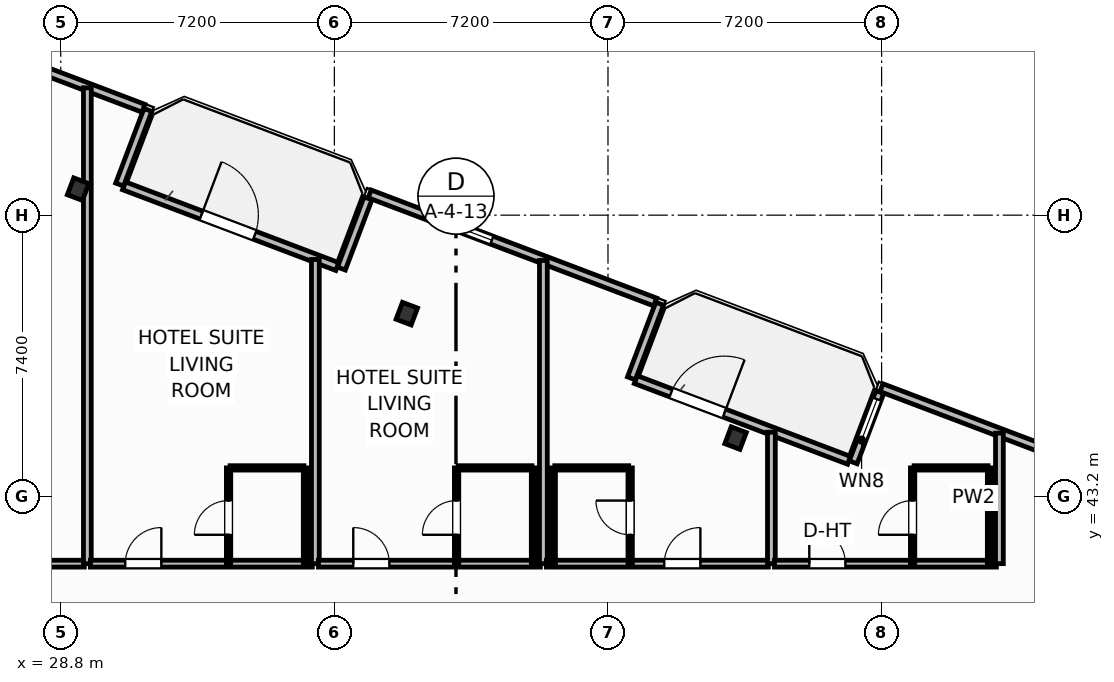
"""IFC4 building model, lengths in metres.
Left out: names, types, materials, properties, quantities, classifications, styles, units other than length and angle.
Written with IfcOpenShell. Run it as: python <this file> out.ifc"""

import sys

from ifc_helpers import new_model, si_unit, direction, frame, frame_2d, origin, origin_2d, place, context, subcontext, project, spatial, rectangle, i_section, extrude, element, fill, save


model = new_model("IFC4")
c1 = context("Model", 3, precision=1e-05, world=origin(), true_north=direction((0.0, 1.0)))
c2 = subcontext(c1, "Body", "Model", "MODEL_VIEW")
j1 = project(units=[si_unit("LENGTHUNIT", "METRE"), si_unit("PLANEANGLEUNIT", "RADIAN")], contexts=[c1])
p1 = place(None, origin())
s1 = spatial("IfcSite", under=j1, at=p1, CompositionType="ELEMENT")
p2 = place(p1, origin())
s2 = spatial("IfcBuilding", under=s1, at=p2, CompositionType="ELEMENT")
p3 = place(p2, frame((0.0, 0.0, 94.7)))
s3 = spatial("IfcBuildingStorey", under=s2, at=p3, CompositionType="ELEMENT", Elevation=94.7)
for number, where, z_axis, x_axis in (
    (1, (46.557, 44.734, 0.0), (0.0, 0.0, 1.0), (0.935, -0.354, 0.0)),
    (2, (37.906, 48.009, 0.0), (0.0, 0.0, 1.0), (0.935, -0.354, 0.0)),
    (3, (29.256, 51.284, 0.0), (0.0, 0.0, 1.0), (0.935, -0.354, 0.0)),
):
    element("IfcColumn", number, at=place(p3, frame(where, z_axis=z_axis, x_axis=x_axis)), inside=s3, PredefinedType="COLUMN", context=c2, shape_type="SweptSolid", body=[
        extrude(i_section(OverallWidth=0.424, OverallDepth=0.474, WebThickness=0.048, FlangeThickness=0.077, FilletRadius=0.025, at=origin_2d()), origin(), (0.0, 0.0, 1.0), 3.7),
    ])
p4 = place(p3, frame((30.465, 51.372, 0.0), z_axis=(0.0, 0.0, 1.0), x_axis=(0.935227640088, -0.354046976001, 0.0)))
e4 = element("IfcWall", 4, at=p4, inside=s3, PredefinedType="SOLIDWALL", context=c2, shape_type="SweptSolid", body=[
    extrude(rectangle(XDim=6.0, YDim=0.22, at=frame_2d((3.0, 0.0))), origin(), (0.0, 0.0, 1.0), 2.73),
])
p5 = place(p4, frame((2.176, 0.0, 0.0)))
e5 = element("IfcOpeningElement", 5, at=p5, cuts=e4, PredefinedType="OPENING", context=c2, shape_type="SweptSolid", body=[
    extrude(rectangle(XDim=1.5, YDim=2.25, at=frame_2d((0.75, 1.125))), frame((0.0, 0.12, 0.0), z_axis=(0.0, -1.0, 0.0), x_axis=(1.0, 0.0, 0.0)), (0.0, 0.0, 1.0), 0.24),
])
p6 = place(p3, frame((43.932, 46.273, 0.0), z_axis=(0.0, 0.0, 1.0), x_axis=(0.93521416643, -0.354082565101, 0.0)))
e6 = element("IfcWall", 6, at=p6, inside=s3, PredefinedType="SOLIDWALL", context=c2, shape_type="SweptSolid", body=[
    extrude(rectangle(XDim=6.0, YDim=0.22, at=frame_2d((3.0, 0.0))), origin(), (0.0, 0.0, 1.0), 2.73),
])
p7 = place(p6, frame((0.992, 0.0, 0.0)))
e7 = element("IfcOpeningElement", 7, at=p7, cuts=e6, PredefinedType="OPENING", context=c2, shape_type="SweptSolid", body=[
    extrude(rectangle(XDim=1.5, YDim=2.25, at=frame_2d((0.75, 1.125))), frame((0.0, 0.12, 0.0), z_axis=(0.0, -1.0, 0.0), x_axis=(1.0, 0.0, 0.0)), (0.0, 0.0, 1.0), 0.24),
])
p8 = place(p3, frame((57.91, 43.216, 0.0), z_axis=(0.0, 0.0, 1.0), x_axis=(-0.935220736163, 0.354065212427, 0.0)))
e8 = element("IfcWall", 8, at=p8, inside=s3, PredefinedType="SOLIDWALL", context=c2, shape_type="SweptSolid", body=[
    extrude(rectangle(XDim=8.035, YDim=0.22, at=frame_2d((4.018, 0.0))), origin(), (0.0, 0.0, 1.0), 2.73),
])
p9 = place(p8, frame((1.788, 0.0, 0.8)))
e9 = element("IfcOpeningElement", 9, at=p9, cuts=e8, PredefinedType="OPENING", context=c2, shape_type="SweptSolid", body=[
    extrude(rectangle(XDim=1.65, YDim=1.65, at=frame_2d((0.825, 0.825))), frame((0.0, 0.12, 0.0), z_axis=(0.0, -1.0, 0.0), x_axis=(1.0, 0.0, 0.0)), (0.0, 0.0, 1.0), 0.24),
])
p10 = place(p3, frame((50.352, 45.944, 0.0), z_axis=(0.0, 0.0, 1.0), x_axis=(-0.354061611705, -0.935222099352, 0.0)))
e10 = element("IfcWall", 10, at=p10, inside=s3, PredefinedType="SOLIDWALL", context=c2, shape_type="SweptSolid", body=[
    extrude(rectangle(XDim=1.975, YDim=0.22, at=frame_2d((0.987, 0.0))), origin(), (0.0, 0.0, 1.0), 2.73),
])
p11 = place(p10, frame((0.2, 0.0, 0.8)))
e11 = element("IfcOpeningElement", 11, at=p11, cuts=e10, PredefinedType="OPENING", context=c2, shape_type="SweptSolid", body=[
    extrude(rectangle(XDim=1.15, YDim=1.4, at=frame_2d((0.575, 0.7))), frame((0.0, 0.12, 0.0), z_axis=(0.0, -1.0, 0.0), x_axis=(1.0, 0.0, 0.0)), (0.0, 0.0, 1.0), 0.24),
])
p12 = place(p3, frame((43.817, 46.306, 0.0), z_axis=(0.0, 0.0, 1.0), x_axis=(0.353988291547, 0.935249854022, 0.0)))
e12 = element("IfcWall", 12, at=p12, inside=s3, PredefinedType="SOLIDWALL", context=c2, shape_type="SweptSolid", body=[
    extrude(rectangle(XDim=2.1, YDim=0.22, at=frame_2d((1.05, 0.0))), origin(), (0.0, 0.0, 1.0), 2.73),
])
p13 = place(p3, frame((44.443, 48.314, 0.0), z_axis=(0.0, 0.0, 1.0), x_axis=(-0.935226988293, 0.354048697735, 0.0)))
e13 = element("IfcWall", 13, at=p13, inside=s3, PredefinedType="SOLIDWALL", context=c2, shape_type="SweptSolid", body=[
    extrude(rectangle(XDim=8.035, YDim=0.22, at=frame_2d((4.018, 0.0))), origin(), (0.0, 0.0, 1.0), 2.73),
])
p14 = place(p13, frame((4.597, 0.0, 0.8)))
e14 = element("IfcOpeningElement", 14, at=p14, cuts=e13, PredefinedType="OPENING", context=c2, shape_type="SweptSolid", body=[
    extrude(rectangle(XDim=1.65, YDim=1.65, at=frame_2d((0.825, 0.825))), frame((0.0, 0.12, 0.0), z_axis=(0.0, -1.0, 0.0), x_axis=(1.0, 0.0, 0.0)), (0.0, 0.0, 1.0), 0.24),
])
p15 = place(p3, frame((36.885, 51.042, 0.0), z_axis=(0.0, 0.0, 1.0), x_axis=(-0.354128791944, -0.935196663123, 0.0)))
e15 = element("IfcWall", 15, at=p15, inside=s3, PredefinedType="SOLIDWALL", context=c2, shape_type="SweptSolid", body=[
    extrude(rectangle(XDim=1.975, YDim=0.22, at=frame_2d((0.988, 0.0))), origin(), (0.0, 0.0, 1.0), 2.73),
])
p16 = place(p3, frame((30.349, 51.405, 0.0), z_axis=(0.0, 0.0, 1.0), x_axis=(0.354128469405, 0.935196785258, 0.0)))
e16 = element("IfcWall", 16, at=p16, inside=s3, PredefinedType="SOLIDWALL", context=c2, shape_type="SweptSolid", body=[
    extrude(rectangle(XDim=2.1, YDim=0.22, at=frame_2d((1.05, 0.0))), origin(), (0.0, 0.0, 1.0), 2.73),
])
p17 = place(p3, frame((30.976, 53.413, 0.0), z_axis=(0.0, 0.0, 1.0), x_axis=(-0.935220327379, 0.354066292178, 0.0)))
e17 = element("IfcWall", 17, at=p17, inside=s3, PredefinedType="SOLIDWALL", context=c2, shape_type="SweptSolid", body=[
    extrude(rectangle(XDim=14.347, YDim=0.22, at=frame_2d((7.174, 0.0))), origin(), (0.0, 0.0, 1.0), 2.73),
])
p18 = place(p17, frame((3.555, 0.0, 0.8)))
e18 = element("IfcOpeningElement", 18, at=p18, cuts=e17, PredefinedType="OPENING", context=c2, shape_type="SweptSolid", body=[
    extrude(rectangle(XDim=1.65, YDim=1.65, at=frame_2d((0.825, 0.825))), frame((0.0, 0.12, 0.0), z_axis=(0.0, -1.0, 0.0), x_axis=(1.0, 0.0, 0.0)), (0.0, 0.0, 1.0), 0.24),
])
p19 = place(p3, frame((23.58, 41.43, 0.0), z_axis=(0.0, 0.0, 1.0), x_axis=(1.0, 0.0, 0.0)))
e19 = element("IfcWall", 19, at=p19, inside=s3, PredefinedType="PARTITIONING", context=c2, shape_type="SweptSolid", body=[
    extrude(rectangle(XDim=5.84, YDim=0.18, at=frame_2d((2.92, 0.0))), origin(), (0.0, 0.0, 1.0), 3.45),
])
p20 = place(p19, frame((3.101, 0.0, 0.0)))
e20 = element("IfcOpeningElement", 20, at=p20, cuts=e19, PredefinedType="OPENING", context=c2, shape_type="SweptSolid", body=[
    extrude(rectangle(XDim=0.95, YDim=2.15, at=frame_2d((0.475, 1.075))), frame((0.0, 0.1, 0.0), z_axis=(0.0, -1.0, 0.0), x_axis=(1.0, 0.0, 0.0)), (0.0, 0.0, 1.0), 0.2),
])
p21 = place(p3, frame((29.5, 41.43, 0.0), z_axis=(0.0, 0.0, 1.0), x_axis=(0.0, 1.0, 0.0)))
e21 = element("IfcWall", 21, at=p21, inside=s3, PredefinedType="PARTITIONING", context=c2, shape_type="SweptSolid", body=[
    extrude(rectangle(XDim=12.52, YDim=0.205, at=frame_2d((6.26, 0.0))), origin(), (0.0, 0.0, 1.0), 2.58),
])
p22 = place(p3, frame((29.58, 41.43, 0.0), z_axis=(0.0, 0.0, 1.0), x_axis=(1.0, 0.0, 0.0)))
e22 = element("IfcWall", 22, at=p22, inside=s3, PredefinedType="PARTITIONING", context=c2, shape_type="SweptSolid", body=[
    extrude(rectangle(XDim=5.84, YDim=0.18, at=frame_2d((2.92, 0.0))), origin(), (0.0, 0.0, 1.0), 3.45),
])
p23 = place(p22, frame((0.917, 0.0, 0.0)))
e23 = element("IfcOpeningElement", 23, at=p23, cuts=e22, PredefinedType="OPENING", context=c2, shape_type="SweptSolid", body=[
    extrude(rectangle(XDim=0.95, YDim=2.15, at=frame_2d((0.475, 1.075))), frame((0.0, 0.1, 0.0), z_axis=(0.0, -1.0, 0.0), x_axis=(1.0, 0.0, 0.0)), (0.0, 0.0, 1.0), 0.2),
])
p24 = place(p3, frame((33.256, 43.95, 0.0), z_axis=(0.0, 0.0, 1.0), x_axis=(1.0, 0.0, 0.0)))
e24 = element("IfcWall", 24, at=p24, inside=s3, PredefinedType="PARTITIONING", context=c2, shape_type="SweptSolid", body=[
    extrude(rectangle(XDim=1.944, YDim=0.115, at=frame_2d((0.972, 0.0))), origin(), (0.0, 0.0, 1.0), 3.45),
])
p25 = place(p3, frame((33.216, 41.43, 0.0), z_axis=(0.0, 0.0, 1.0), x_axis=(0.0, 1.0, 0.0)))
e25 = element("IfcWall", 25, at=p25, inside=s3, PredefinedType="PARTITIONING", context=c2, shape_type="SweptSolid", body=[
    extrude(rectangle(XDim=2.52, YDim=0.115, at=frame_2d((1.26, 0.0))), origin(), (0.0, 0.0, 1.0), 3.45),
])
p26 = place(p25, frame((0.76, 0.0, 0.0)))
e26 = element("IfcOpeningElement", 26, at=p26, cuts=e25, PredefinedType="OPENING", context=c2, shape_type="SweptSolid", body=[
    extrude(rectangle(XDim=0.9, YDim=2.05, at=frame_2d((0.45, 1.025))), frame((0.0, 0.067, 0.0), z_axis=(0.0, -1.0, 0.0), x_axis=(1.0, 0.0, 0.0)), (0.0, 0.0, 1.0), 0.135),
])
p27 = place(p3, frame((35.24, 41.43, 0.0), z_axis=(0.0, 0.0, 1.0), x_axis=(0.0, 1.0, 0.0)))
e27 = element("IfcWall", 27, at=p27, inside=s3, PredefinedType="PARTITIONING", context=c2, shape_type="SweptSolid", body=[
    extrude(rectangle(XDim=2.52, YDim=0.115, at=frame_2d((1.26, 0.0))), origin(), (0.0, 0.0, 1.0), 3.45),
])
p28 = place(p3, frame((35.5, 41.43, 0.0), z_axis=(0.0, 0.0, 1.0), x_axis=(0.0, 1.0, 0.0)))
e28 = element("IfcWall", 28, at=p28, inside=s3, PredefinedType="PARTITIONING", context=c2, shape_type="SweptSolid", body=[
    extrude(rectangle(XDim=8.003, YDim=0.205, at=frame_2d((4.002, 0.0))), origin(), (0.0, 0.0, 1.0), 3.45),
])
p29 = place(p3, frame((35.58, 41.43, 0.0), z_axis=(0.0, 0.0, 1.0), x_axis=(1.0, 0.0, 0.0)))
e29 = element("IfcWall", 29, at=p29, inside=s3, PredefinedType="PARTITIONING", context=c2, shape_type="SweptSolid", body=[
    extrude(rectangle(XDim=5.84, YDim=0.18, at=frame_2d((2.92, 0.0))), origin(), (0.0, 0.0, 1.0), 3.45),
])
p30 = place(p29, frame((0.917, 0.0, 0.0)))
e30 = element("IfcOpeningElement", 30, at=p30, cuts=e29, PredefinedType="OPENING", context=c2, shape_type="SweptSolid", body=[
    extrude(rectangle(XDim=0.95, YDim=2.15, at=frame_2d((0.475, 1.075))), frame((0.0, 0.1, 0.0), z_axis=(0.0, -1.0, 0.0), x_axis=(1.0, 0.0, 0.0)), (0.0, 0.0, 1.0), 0.2),
])
p31 = place(p3, frame((39.256, 43.95, 0.0), z_axis=(0.0, 0.0, 1.0), x_axis=(1.0, 0.0, 0.0)))
e31 = element("IfcWall", 31, at=p31, inside=s3, PredefinedType="PARTITIONING", context=c2, shape_type="SweptSolid", body=[
    extrude(rectangle(XDim=1.944, YDim=0.115, at=frame_2d((0.972, 0.0))), origin(), (0.0, 0.0, 1.0), 3.45),
])
p32 = place(p3, frame((39.216, 41.43, 0.0), z_axis=(0.0, 0.0, 1.0), x_axis=(0.0, 1.0, 0.0)))
e32 = element("IfcWall", 32, at=p32, inside=s3, PredefinedType="PARTITIONING", context=c2, shape_type="SweptSolid", body=[
    extrude(rectangle(XDim=2.52, YDim=0.115, at=frame_2d((1.26, 0.0))), origin(), (0.0, 0.0, 1.0), 3.45),
])
p33 = place(p32, frame((0.76, 0.0, 0.0)))
e33 = element("IfcOpeningElement", 33, at=p33, cuts=e32, PredefinedType="OPENING", context=c2, shape_type="SweptSolid", body=[
    extrude(rectangle(XDim=0.9, YDim=2.05, at=frame_2d((0.45, 1.025))), frame((0.0, 0.067, 0.0), z_axis=(0.0, -1.0, 0.0), x_axis=(1.0, 0.0, 0.0)), (0.0, 0.0, 1.0), 0.135),
])
p34 = place(p3, frame((41.24, 41.43, 0.0), z_axis=(0.0, 0.0, 1.0), x_axis=(0.0, 1.0, 0.0)))
e34 = element("IfcWall", 34, at=p34, inside=s3, PredefinedType="PARTITIONING", context=c2, shape_type="SweptSolid", body=[
    extrude(rectangle(XDim=2.52, YDim=0.115, at=frame_2d((1.26, 0.0))), origin(), (0.0, 0.0, 1.0), 3.45),
])
p35 = place(p3, frame((41.5, 41.43, 0.0), z_axis=(0.0, 0.0, 1.0), x_axis=(0.0, 1.0, 0.0)))
e35 = element("IfcWall", 35, at=p35, inside=s3, PredefinedType="PARTITIONING", context=c2, shape_type="SweptSolid", body=[
    extrude(rectangle(XDim=7.977, YDim=0.205, at=frame_2d((3.989, 0.0))), origin(), (0.0, 0.0, 1.0), 3.45),
])
p36 = place(p3, frame((41.58, 41.43, 0.0), z_axis=(0.0, 0.0, 1.0), x_axis=(1.0, 0.0, 0.0)))
e36 = element("IfcWall", 36, at=p36, inside=s3, PredefinedType="PARTITIONING", context=c2, shape_type="SweptSolid", body=[
    extrude(rectangle(XDim=5.84, YDim=0.18, at=frame_2d((2.92, 0.0))), origin(), (0.0, 0.0, 1.0), 3.45),
])
p37 = place(p36, frame((3.101, 0.0, 0.0)))
e37 = element("IfcOpeningElement", 37, at=p37, cuts=e36, PredefinedType="OPENING", context=c2, shape_type="SweptSolid", body=[
    extrude(rectangle(XDim=0.95, YDim=2.15, at=frame_2d((0.475, 1.075))), frame((0.0, 0.1, 0.0), z_axis=(0.0, -1.0, 0.0), x_axis=(1.0, 0.0, 0.0)), (0.0, 0.0, 1.0), 0.2),
])
p38 = place(p3, frame((41.8, 43.95, 0.0), z_axis=(0.0, 0.0, 1.0), x_axis=(1.0, 0.0, 0.0)))
e38 = element("IfcWall", 38, at=p38, inside=s3, PredefinedType="PARTITIONING", context=c2, shape_type="SweptSolid", body=[
    extrude(rectangle(XDim=1.944, YDim=0.115, at=frame_2d((0.972, 0.0))), origin(), (0.0, 0.0, 1.0), 2.972),
])
p39 = place(p3, frame((43.784, 41.43, 0.0), z_axis=(0.0, 0.0, 1.0), x_axis=(0.0, 1.0, 0.0)))
e39 = element("IfcWall", 39, at=p39, inside=s3, PredefinedType="PARTITIONING", context=c2, shape_type="SweptSolid", body=[
    extrude(rectangle(XDim=2.52, YDim=0.115, at=frame_2d((1.26, 0.0))), origin(), (0.0, 0.0, 1.0), 3.45),
])
p40 = place(p39, frame((0.76, 0.0, 0.0)))
e40 = element("IfcOpeningElement", 40, at=p40, cuts=e39, PredefinedType="OPENING", context=c2, shape_type="SweptSolid", body=[
    extrude(rectangle(XDim=0.9, YDim=2.05, at=frame_2d((0.45, 1.025))), frame((0.0, 0.067, 0.0), z_axis=(0.0, -1.0, 0.0), x_axis=(1.0, 0.0, 0.0)), (0.0, 0.0, 1.0), 0.135),
])
p41 = place(p3, frame((41.76, 41.43, 0.0), z_axis=(0.0, 0.0, 1.0), x_axis=(0.0, 1.0, 0.0)))
e41 = element("IfcWall", 41, at=p41, inside=s3, PredefinedType="PARTITIONING", context=c2, shape_type="SweptSolid", body=[
    extrude(rectangle(XDim=2.52, YDim=0.115, at=frame_2d((1.26, 0.0))), origin(), (0.0, 0.0, 1.0), 3.45),
])
p42 = place(p3, frame((47.5, 41.43, 0.0), z_axis=(0.0, 0.0, 1.0), x_axis=(0.0, 1.0, 0.0)))
e42 = element("IfcWall", 42, at=p42, inside=s3, PredefinedType="PARTITIONING", context=c2, shape_type="SweptSolid", body=[
    extrude(rectangle(XDim=3.46, YDim=0.205, at=frame_2d((1.73, 0.0))), origin(), (0.0, 0.0, 1.0), 3.45),
])
p43 = place(p3, frame((47.58, 41.43, 0.0), z_axis=(0.0, 0.0, 1.0), x_axis=(1.0, 0.0, 0.0)))
e43 = element("IfcWall", 43, at=p43, inside=s3, PredefinedType="PARTITIONING", context=c2, shape_type="SweptSolid", body=[
    extrude(rectangle(XDim=5.84, YDim=0.18, at=frame_2d((2.92, 0.0))), origin(), (0.0, 0.0, 1.0), 3.45),
])
p44 = place(p43, frame((0.917, 0.0, 0.0)))
e44 = element("IfcOpeningElement", 44, at=p44, cuts=e43, PredefinedType="OPENING", context=c2, shape_type="SweptSolid", body=[
    extrude(rectangle(XDim=0.95, YDim=2.15, at=frame_2d((0.475, 1.075))), frame((0.0, 0.1, 0.0), z_axis=(0.0, -1.0, 0.0), x_axis=(1.0, 0.0, 0.0)), (0.0, 0.0, 1.0), 0.2),
])
p45 = place(p3, frame((51.256, 43.95, 0.0), z_axis=(0.0, 0.0, 1.0), x_axis=(1.0, 0.0, 0.0)))
e45 = element("IfcWall", 45, at=p45, inside=s3, PredefinedType="PARTITIONING", context=c2, shape_type="SweptSolid", body=[
    extrude(rectangle(XDim=1.944, YDim=0.115, at=frame_2d((0.972, 0.0))), origin(), (0.0, 0.0, 1.0), 3.45),
])
p46 = place(p3, frame((51.216, 41.43, 0.0), z_axis=(0.0, 0.0, 1.0), x_axis=(0.0, 1.0, 0.0)))
e46 = element("IfcWall", 46, at=p46, inside=s3, PredefinedType="PARTITIONING", context=c2, shape_type="SweptSolid", body=[
    extrude(rectangle(XDim=2.52, YDim=0.115, at=frame_2d((1.26, 0.0))), origin(), (0.0, 0.0, 1.0), 3.45),
])
p47 = place(p46, frame((0.76, 0.0, 0.0)))
e47 = element("IfcOpeningElement", 47, at=p47, cuts=e46, PredefinedType="OPENING", context=c2, shape_type="SweptSolid", body=[
    extrude(rectangle(XDim=0.9, YDim=2.05, at=frame_2d((0.45, 1.025))), frame((0.0, 0.067, 0.0), z_axis=(0.0, -1.0, 0.0), x_axis=(1.0, 0.0, 0.0)), (0.0, 0.0, 1.0), 0.135),
])
p48 = place(p3, frame((53.24, 41.43, 0.0), z_axis=(0.0, 0.0, 1.0), x_axis=(0.0, 1.0, 0.0)))
e48 = element("IfcWall", 48, at=p48, inside=s3, PredefinedType="PARTITIONING", context=c2, shape_type="SweptSolid", body=[
    extrude(rectangle(XDim=2.52, YDim=0.115, at=frame_2d((1.26, 0.0))), origin(), (0.0, 0.0, 1.0), 3.45),
])
p49 = place(p3, frame((53.5, 41.43, 0.0), z_axis=(0.0, 0.0, 1.0), x_axis=(0.0, 1.0, 0.0)))
e49 = element("IfcWall", 49, at=p49, inside=s3, PredefinedType="PARTITIONING", context=c2, shape_type="SweptSolid", body=[
    extrude(rectangle(XDim=3.434, YDim=0.205, at=frame_2d((1.717, 0.0))), origin(), (0.0, 0.0, 1.0), 3.45),
])
p50 = place(p5, origin())
e50 = element("IfcDoor", 50, at=p50, inside=s3, OperationType="SINGLE_SWING_LEFT", PredefinedType="DOOR", context=c2, shape_type="SweptSolid", body=[
    extrude(rectangle(XDim=1.5, YDim=2.25, at=frame_2d((0.75, 1.125))), frame((0.0, 0.025, 0.0), z_axis=(0.0, -1.0, 0.0), x_axis=(1.0, 0.0, 0.0)), (0.0, 0.0, 1.0), 0.05),
])
fill(e5, e50)
p51 = place(p7, origin())
e51 = element("IfcDoor", 51, at=p51, inside=s3, OperationType="SINGLE_SWING_RIGHT", PredefinedType="DOOR", context=c2, shape_type="SweptSolid", body=[
    extrude(rectangle(XDim=1.5, YDim=2.25, at=frame_2d((0.75, 1.125))), frame((0.0, 0.025, 0.0), z_axis=(0.0, -1.0, 0.0), x_axis=(1.0, 0.0, 0.0)), (0.0, 0.0, 1.0), 0.05),
])
fill(e7, e51)
p52 = place(p14, origin())
e52 = element("IfcWindow", 52, at=p52, inside=s3, PartitioningType="SINGLE_PANEL", PredefinedType="WINDOW", context=c2, shape_type="SweptSolid", body=[
    extrude(rectangle(XDim=1.65, YDim=1.65, at=frame_2d((0.825, 0.825))), frame((0.0, 0.03, 0.0), z_axis=(0.0, -1.0, 0.0), x_axis=(1.0, 0.0, 0.0)), (0.0, 0.0, 1.0), 0.06),
])
fill(e14, e52)
p53 = place(p23, origin())
e53 = element("IfcDoor", 53, at=p53, inside=s3, OperationType="SINGLE_SWING_RIGHT", PredefinedType="DOOR", context=c2, shape_type="SweptSolid", body=[
    extrude(rectangle(XDim=0.95, YDim=2.15, at=frame_2d((0.475, 1.075))), frame((0.0, 0.025, 0.0), z_axis=(0.0, -1.0, 0.0), x_axis=(1.0, 0.0, 0.0)), (0.0, 0.0, 1.0), 0.05),
])
fill(e23, e53)
p54 = place(p26, origin())
e54 = element("IfcDoor", 54, at=p54, inside=s3, OperationType="SINGLE_SWING_LEFT", PredefinedType="DOOR", context=c2, shape_type="SweptSolid", body=[
    extrude(rectangle(XDim=0.9, YDim=2.05, at=frame_2d((0.45, 1.025))), frame((0.0, 0.025, 0.0), z_axis=(0.0, -1.0, 0.0), x_axis=(1.0, 0.0, 0.0)), (0.0, 0.0, 1.0), 0.05),
])
fill(e26, e54)
p55 = place(p30, origin())
e55 = element("IfcDoor", 55, at=p55, inside=s3, OperationType="SINGLE_SWING_LEFT", PredefinedType="DOOR", context=c2, shape_type="SweptSolid", body=[
    extrude(rectangle(XDim=0.95, YDim=2.15, at=frame_2d((0.475, 1.075))), frame((0.0, 0.025, 0.0), z_axis=(0.0, -1.0, 0.0), x_axis=(1.0, 0.0, 0.0)), (0.0, 0.0, 1.0), 0.05),
])
fill(e30, e55)
p56 = place(p33, origin())
e56 = element("IfcDoor", 56, at=p56, inside=s3, OperationType="SINGLE_SWING_LEFT", PredefinedType="DOOR", context=c2, shape_type="SweptSolid", body=[
    extrude(rectangle(XDim=0.9, YDim=2.05, at=frame_2d((0.45, 1.025))), frame((0.0, 0.025, 0.0), z_axis=(0.0, -1.0, 0.0), x_axis=(1.0, 0.0, 0.0)), (0.0, 0.0, 1.0), 0.05),
])
fill(e33, e56)
p57 = place(p37, origin())
e57 = element("IfcDoor", 57, at=p57, inside=s3, OperationType="SINGLE_SWING_RIGHT", PredefinedType="DOOR", context=c2, shape_type="SweptSolid", body=[
    extrude(rectangle(XDim=0.95, YDim=2.15, at=frame_2d((0.475, 1.075))), frame((0.0, 0.025, 0.0), z_axis=(0.0, -1.0, 0.0), x_axis=(1.0, 0.0, 0.0)), (0.0, 0.0, 1.0), 0.05),
])
fill(e37, e57)
p58 = place(p40, origin())
e58 = element("IfcDoor", 58, at=p58, inside=s3, OperationType="SINGLE_SWING_RIGHT", PredefinedType="DOOR", context=c2, shape_type="SweptSolid", body=[
    extrude(rectangle(XDim=0.9, YDim=2.05, at=frame_2d((0.45, 1.025))), frame((0.0, 0.025, 0.0), z_axis=(0.0, -1.0, 0.0), x_axis=(1.0, 0.0, 0.0)), (0.0, 0.0, 1.0), 0.05),
])
fill(e40, e58)
p59 = place(p44, origin())
e59 = element("IfcDoor", 59, at=p59, inside=s3, OperationType="SINGLE_SWING_LEFT", PredefinedType="DOOR", context=c2, shape_type="SweptSolid", body=[
    extrude(rectangle(XDim=0.95, YDim=2.15, at=frame_2d((0.475, 1.075))), frame((0.0, 0.025, 0.0), z_axis=(0.0, -1.0, 0.0), x_axis=(1.0, 0.0, 0.0)), (0.0, 0.0, 1.0), 0.05),
])
fill(e44, e59)
p60 = place(p47, origin())
e60 = element("IfcDoor", 60, at=p60, inside=s3, OperationType="SINGLE_SWING_LEFT", PredefinedType="DOOR", context=c2, shape_type="SweptSolid", body=[
    extrude(rectangle(XDim=0.9, YDim=2.05, at=frame_2d((0.45, 1.025))), frame((0.0, 0.025, 0.0), z_axis=(0.0, -1.0, 0.0), x_axis=(1.0, 0.0, 0.0)), (0.0, 0.0, 1.0), 0.05),
])
fill(e47, e60)
p61 = place(p11, origin())
e61 = element("IfcWindow", 61, at=p61, inside=s3, PartitioningType="SINGLE_PANEL", PredefinedType="WINDOW", context=c2, shape_type="SweptSolid", body=[
    extrude(rectangle(XDim=1.15, YDim=1.4, at=frame_2d((0.575, 0.7))), frame((0.0, 0.03, 0.0), z_axis=(0.0, -1.0, 0.0), x_axis=(1.0, 0.0, 0.0)), (0.0, 0.0, 1.0), 0.06),
])
fill(e11, e61)
save(model, sys.argv[1])
